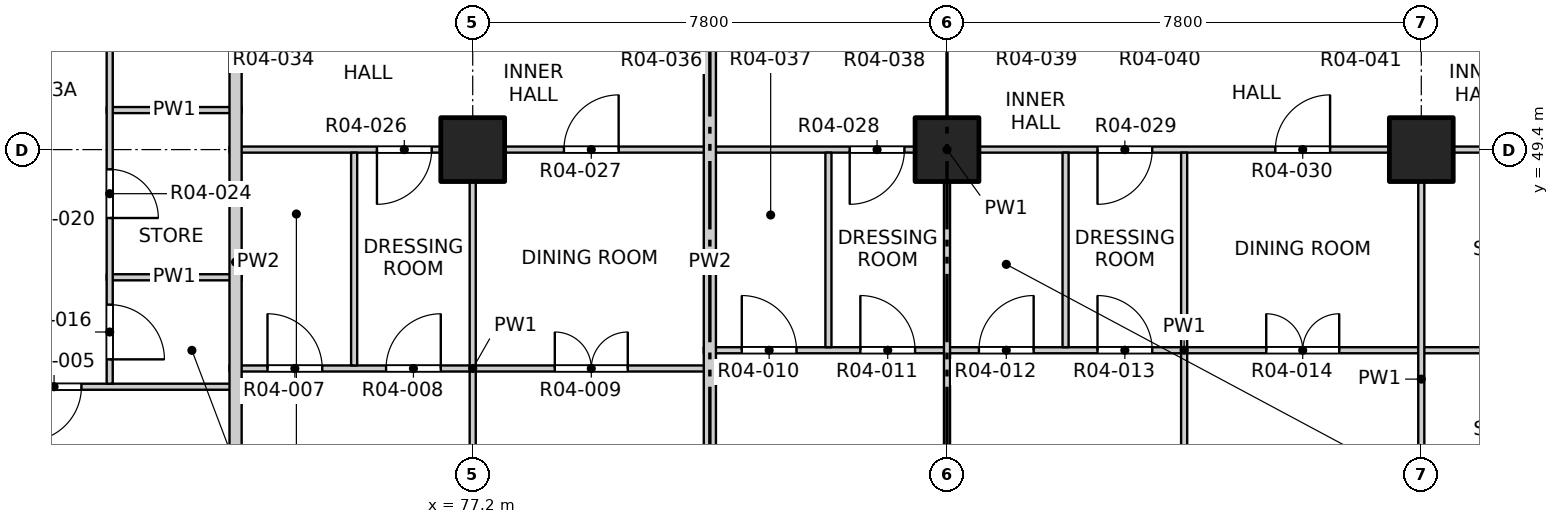
"""IFC4 building model, lengths in metres.
Left out: names, types, materials, properties, quantities, classifications, styles, units other than length and angle.
Written with IfcOpenShell. Run it as: python <this file> out.ifc"""

import sys

from ifc_helpers import new_model, si_unit, direction, frame, frame_2d, origin, origin_2d, place, context, subcontext, project, spatial, rectangle, extrude, element, fill, save


model = new_model("IFC4")
c1 = context("Model", 3, precision=1e-05, world=origin(), true_north=direction((0.0, 1.0)))
c2 = subcontext(c1, "Body", "Model", "MODEL_VIEW")
j1 = project(units=[si_unit("LENGTHUNIT", "METRE"), si_unit("PLANEANGLEUNIT", "RADIAN")], contexts=[c1])
p1 = place(None, origin())
s1 = spatial("IfcSite", under=j1, at=p1, CompositionType="ELEMENT")
p2 = place(p1, origin())
s2 = spatial("IfcBuilding", under=s1, at=p2, CompositionType="ELEMENT")
p3 = place(p2, frame((0.0, 0.0, 58.0)))
s3 = spatial("IfcBuildingStorey", under=s2, at=p3, CompositionType="ELEMENT", Elevation=58.0)
for number, where, z_axis, x_axis in (
    (1, (77.2, 49.4, -0.25), (0.0, 0.0, 1.0), (1.0, 0.0, 0.0)),
    (2, (85.0, 49.4, -0.25), (0.0, 0.0, 1.0), (1.0, 0.0, 0.0)),
    (3, (92.8, 49.4, -0.25), (0.0, 0.0, 1.0), (1.0, 0.0, 0.0)),
):
    element("IfcColumn", number, at=place(p3, frame(where, z_axis=z_axis, x_axis=x_axis)), inside=s3, PredefinedType="COLUMN", context=c2, shape_type="SweptSolid", body=[
        extrude(rectangle(XDim=1.05, YDim=1.05, at=origin_2d()), origin(), (0.0, 0.0, 1.0), 3.4),
    ])
p4 = place(p3, frame((61.9, 45.5, 0.0), z_axis=(0.0, 0.0, 1.0), x_axis=(1.0, 0.0, 0.0)))
e4 = element("IfcWall", 4, at=p4, inside=s3, PredefinedType="PARTITIONING", context=c2, shape_type="SweptSolid", body=[
    extrude(rectangle(XDim=11.5, YDim=0.1, at=frame_2d((5.75, 0.0))), origin(), (0.0, 0.0, 1.0), 3.15),
])
p5 = place(p4, frame((7.965, 0.0, 0.0)))
e5 = element("IfcOpeningElement", 5, at=p5, cuts=e4, PredefinedType="OPENING", context=c2, shape_type="SweptSolid", body=[
    extrude(rectangle(XDim=0.9, YDim=2.1, at=frame_2d((0.45, 1.05))), frame((0.0, 0.06, 0.0), z_axis=(0.0, -1.0, 0.0), x_axis=(1.0, 0.0, 0.0)), (0.0, 0.0, 1.0), 0.12),
])
p6 = place(p3, frame((73.2, 45.8, 0.0), z_axis=(0.0, 0.0, 1.0), x_axis=(1.0, 0.0, 0.0)))
e6 = element("IfcWall", 6, at=p6, inside=s3, PredefinedType="PARTITIONING", context=c2, shape_type="SweptSolid", body=[
    extrude(rectangle(XDim=8.0, YDim=0.1, at=frame_2d((4.0, 0.0))), origin(), (0.0, 0.0, 1.0), 3.15),
])
p7 = place(p6, frame((0.625, 0.0, 0.0)))
e7 = element("IfcOpeningElement", 7, at=p7, cuts=e6, PredefinedType="OPENING", context=c2, shape_type="SweptSolid", body=[
    extrude(rectangle(XDim=0.9, YDim=2.1, at=frame_2d((0.45, 1.05))), frame((0.0, 0.06, 0.0), z_axis=(0.0, -1.0, 0.0), x_axis=(1.0, 0.0, 0.0)), (0.0, 0.0, 1.0), 0.12),
])
p8 = place(p6, frame((2.575, 0.0, 0.0)))
e8 = element("IfcOpeningElement", 8, at=p8, cuts=e6, PredefinedType="OPENING", context=c2, shape_type="SweptSolid", body=[
    extrude(rectangle(XDim=0.9, YDim=2.1, at=frame_2d((0.45, 1.05))), frame((0.0, 0.06, 0.0), z_axis=(0.0, -1.0, 0.0), x_axis=(1.0, 0.0, 0.0)), (0.0, 0.0, 1.0), 0.12),
])
p9 = place(p6, frame((5.35, 0.0, 0.0)))
e9 = element("IfcOpeningElement", 9, at=p9, cuts=e6, PredefinedType="OPENING", context=c2, shape_type="SweptSolid", body=[
    extrude(rectangle(XDim=1.2, YDim=2.1, at=frame_2d((0.6, 1.05))), frame((0.0, 0.06, 0.0), z_axis=(0.0, -1.0, 0.0), x_axis=(1.0, 0.0, 0.0)), (0.0, 0.0, 1.0), 0.12),
])
p10 = place(p3, frame((81.0, 46.1, 0.0), z_axis=(0.0, 0.0, 1.0), x_axis=(1.0, 0.0, 0.0)))
e10 = element("IfcWall", 10, at=p10, inside=s3, PredefinedType="PARTITIONING", context=c2, shape_type="SweptSolid", body=[
    extrude(rectangle(XDim=15.8, YDim=0.1, at=frame_2d((7.9, 0.0))), origin(), (0.0, 0.0, 1.0), 3.15),
])
p11 = place(p10, frame((0.625, 0.0, 0.0)))
e11 = element("IfcOpeningElement", 11, at=p11, cuts=e10, PredefinedType="OPENING", context=c2, shape_type="SweptSolid", body=[
    extrude(rectangle(XDim=0.9, YDim=2.1, at=frame_2d((0.45, 1.05))), frame((0.0, 0.06, 0.0), z_axis=(0.0, -1.0, 0.0), x_axis=(1.0, 0.0, 0.0)), (0.0, 0.0, 1.0), 0.12),
])
p12 = place(p10, frame((2.575, 0.0, 0.0)))
e12 = element("IfcOpeningElement", 12, at=p12, cuts=e10, PredefinedType="OPENING", context=c2, shape_type="SweptSolid", body=[
    extrude(rectangle(XDim=0.9, YDim=2.1, at=frame_2d((0.45, 1.05))), frame((0.0, 0.06, 0.0), z_axis=(0.0, -1.0, 0.0), x_axis=(1.0, 0.0, 0.0)), (0.0, 0.0, 1.0), 0.12),
])
p13 = place(p10, frame((4.525, 0.0, 0.0)))
e13 = element("IfcOpeningElement", 13, at=p13, cuts=e10, PredefinedType="OPENING", context=c2, shape_type="SweptSolid", body=[
    extrude(rectangle(XDim=0.9, YDim=2.1, at=frame_2d((0.45, 1.05))), frame((0.0, 0.06, 0.0), z_axis=(0.0, -1.0, 0.0), x_axis=(1.0, 0.0, 0.0)), (0.0, 0.0, 1.0), 0.12),
])
p14 = place(p10, frame((6.475, 0.0, 0.0)))
e14 = element("IfcOpeningElement", 14, at=p14, cuts=e10, PredefinedType="OPENING", context=c2, shape_type="SweptSolid", body=[
    extrude(rectangle(XDim=0.9, YDim=2.1, at=frame_2d((0.45, 1.05))), frame((0.0, 0.06, 0.0), z_axis=(0.0, -1.0, 0.0), x_axis=(1.0, 0.0, 0.0)), (0.0, 0.0, 1.0), 0.12),
])
p15 = place(p10, frame((9.25, 0.0, 0.0)))
e15 = element("IfcOpeningElement", 15, at=p15, cuts=e10, PredefinedType="OPENING", context=c2, shape_type="SweptSolid", body=[
    extrude(rectangle(XDim=1.2, YDim=2.1, at=frame_2d((0.6, 1.05))), frame((0.0, 0.06, 0.0), z_axis=(0.0, -1.0, 0.0), x_axis=(1.0, 0.0, 0.0)), (0.0, 0.0, 1.0), 0.12),
])
p16 = place(p10, frame((13.15, 0.0, 0.0)))
e16 = element("IfcOpeningElement", 16, at=p16, cuts=e10, PredefinedType="OPENING", context=c2, shape_type="SweptSolid", body=[
    extrude(rectangle(XDim=1.2, YDim=2.1, at=frame_2d((0.6, 1.05))), frame((0.0, 0.06, 0.0), z_axis=(0.0, -1.0, 0.0), x_axis=(1.0, 0.0, 0.0)), (0.0, 0.0, 1.0), 0.12),
])
p17 = place(p3, frame((71.18, 47.3, 0.0), z_axis=(0.0, 0.0, 1.0), x_axis=(1.0, 0.0, 0.0)))
e17 = element("IfcWall", 17, at=p17, inside=s3, PredefinedType="PARTITIONING", context=c2, shape_type="SweptSolid", body=[
    extrude(rectangle(XDim=2.22, YDim=0.1, at=frame_2d((1.11, 0.0))), origin(), (0.0, 0.0, 1.0), 3.15),
])
p18 = place(p3, frame((73.2, 49.4, 0.0), z_axis=(0.0, 0.0, 1.0), x_axis=(1.0, 0.0, 0.0)))
e18 = element("IfcWall", 18, at=p18, inside=s3, PredefinedType="PARTITIONING", context=c2, shape_type="SweptSolid", body=[
    extrude(rectangle(XDim=23.6, YDim=0.1, at=frame_2d((11.8, 0.0))), origin(), (0.0, 0.0, 1.0), 3.15),
])
p19 = place(p18, frame((2.425, 0.0, 0.0)))
e19 = element("IfcOpeningElement", 19, at=p19, cuts=e18, PredefinedType="OPENING", context=c2, shape_type="SweptSolid", body=[
    extrude(rectangle(XDim=0.9, YDim=2.1, at=frame_2d((0.45, 1.05))), frame((0.0, 0.06, 0.0), z_axis=(0.0, -1.0, 0.0), x_axis=(1.0, 0.0, 0.0)), (0.0, 0.0, 1.0), 0.12),
])
p20 = place(p18, frame((5.5, 0.0, 0.0)))
e20 = element("IfcOpeningElement", 20, at=p20, cuts=e18, PredefinedType="OPENING", context=c2, shape_type="SweptSolid", body=[
    extrude(rectangle(XDim=0.9, YDim=2.1, at=frame_2d((0.45, 1.05))), frame((0.0, 0.06, 0.0), z_axis=(0.0, -1.0, 0.0), x_axis=(1.0, 0.0, 0.0)), (0.0, 0.0, 1.0), 0.12),
])
p21 = place(p18, frame((10.2, 0.0, 0.0)))
e21 = element("IfcOpeningElement", 21, at=p21, cuts=e18, PredefinedType="OPENING", context=c2, shape_type="SweptSolid", body=[
    extrude(rectangle(XDim=0.9, YDim=2.1, at=frame_2d((0.45, 1.05))), frame((0.0, 0.06, 0.0), z_axis=(0.0, -1.0, 0.0), x_axis=(1.0, 0.0, 0.0)), (0.0, 0.0, 1.0), 0.12),
])
p22 = place(p18, frame((14.275, 0.0, 0.0)))
e22 = element("IfcOpeningElement", 22, at=p22, cuts=e18, PredefinedType="OPENING", context=c2, shape_type="SweptSolid", body=[
    extrude(rectangle(XDim=0.9, YDim=2.1, at=frame_2d((0.45, 1.05))), frame((0.0, 0.06, 0.0), z_axis=(0.0, -1.0, 0.0), x_axis=(1.0, 0.0, 0.0)), (0.0, 0.0, 1.0), 0.12),
])
p23 = place(p18, frame((17.2, 0.0, 0.0)))
e23 = element("IfcOpeningElement", 23, at=p23, cuts=e18, PredefinedType="OPENING", context=c2, shape_type="SweptSolid", body=[
    extrude(rectangle(XDim=0.9, YDim=2.1, at=frame_2d((0.45, 1.05))), frame((0.0, 0.06, 0.0), z_axis=(0.0, -1.0, 0.0), x_axis=(1.0, 0.0, 0.0)), (0.0, 0.0, 1.0), 0.12),
])
p24 = place(p18, frame((21.1, 0.0, 0.0)))
e24 = element("IfcOpeningElement", 24, at=p24, cuts=e18, PredefinedType="OPENING", context=c2, shape_type="SweptSolid", body=[
    extrude(rectangle(XDim=0.9, YDim=2.1, at=frame_2d((0.45, 1.05))), frame((0.0, 0.06, 0.0), z_axis=(0.0, -1.0, 0.0), x_axis=(1.0, 0.0, 0.0)), (0.0, 0.0, 1.0), 0.12),
])
p25 = place(p3, frame((71.18, 50.05, 0.0), z_axis=(0.0, 0.0, 1.0), x_axis=(1.0, 0.0, 0.0)))
e25 = element("IfcWall", 25, at=p25, inside=s3, PredefinedType="PARTITIONING", context=c2, shape_type="SweptSolid", body=[
    extrude(rectangle(XDim=2.22, YDim=0.1, at=frame_2d((1.11, 0.0))), origin(), (0.0, 0.0, 1.0), 3.15),
])
p26 = place(p3, frame((71.23, 45.55, 0.0), z_axis=(0.0, 0.0, 1.0), x_axis=(0.0, 1.0, 0.0)))
e26 = element("IfcWall", 26, at=p26, inside=s3, PredefinedType="PARTITIONING", context=c2, shape_type="SweptSolid", body=[
    extrude(rectangle(XDim=9.85, YDim=0.1, at=frame_2d((4.925, 0.0))), origin(), (0.0, 0.0, 1.0), 3.15),
])
p27 = place(p26, frame((0.4, 0.0, 0.0)))
e27 = element("IfcOpeningElement", 27, at=p27, cuts=e26, PredefinedType="OPENING", context=c2, shape_type="SweptSolid", body=[
    extrude(rectangle(XDim=0.9, YDim=2.1, at=frame_2d((0.45, 1.05))), frame((0.0, 0.06, 0.0), z_axis=(0.0, -1.0, 0.0), x_axis=(1.0, 0.0, 0.0)), (0.0, 0.0, 1.0), 0.12),
])
p28 = place(p26, frame((2.725, 0.0, 0.0)))
e28 = element("IfcOpeningElement", 28, at=p28, cuts=e26, PredefinedType="OPENING", context=c2, shape_type="SweptSolid", body=[
    extrude(rectangle(XDim=0.8, YDim=2.1, at=frame_2d((0.4, 1.05))), frame((0.0, 0.06, 0.0), z_axis=(0.0, -1.0, 0.0), x_axis=(1.0, 0.0, 0.0)), (0.0, 0.0, 1.0), 0.12),
])
p29 = place(p26, frame((5.6, 0.0, 0.0)))
e29 = element("IfcOpeningElement", 29, at=p29, cuts=e26, PredefinedType="OPENING", context=c2, shape_type="SweptSolid", body=[
    extrude(rectangle(XDim=0.8, YDim=2.1, at=frame_2d((0.4, 1.05))), frame((0.0, 0.06, 0.0), z_axis=(0.0, -1.0, 0.0), x_axis=(1.0, 0.0, 0.0)), (0.0, 0.0, 1.0), 0.12),
])
p30 = place(p26, frame((8.25, 0.0, 0.0)))
e30 = element("IfcOpeningElement", 30, at=p30, cuts=e26, PredefinedType="OPENING", context=c2, shape_type="SweptSolid", body=[
    extrude(rectangle(XDim=0.9, YDim=2.1, at=frame_2d((0.45, 1.05))), frame((0.0, 0.06, 0.0), z_axis=(0.0, -1.0, 0.0), x_axis=(1.0, 0.0, 0.0)), (0.0, 0.0, 1.0), 0.12),
])
p31 = place(p3, frame((73.3, 41.9, 0.0), z_axis=(0.0, 0.0, 1.0), x_axis=(0.0, 1.0, 0.0)))
e31 = element("IfcWall", 31, at=p31, inside=s3, PredefinedType="PARTITIONING", context=c2, shape_type="SweptSolid", body=[
    extrude(rectangle(XDim=11.3, YDim=0.2, at=frame_2d((5.65, 0.0))), origin(), (0.0, 0.0, 1.0), 3.15),
])
p32 = place(p3, frame((75.25, 45.85, 0.0), z_axis=(0.0, 0.0, 1.0), x_axis=(0.0, 1.0, 0.0)))
e32 = element("IfcWall", 32, at=p32, inside=s3, PredefinedType="PARTITIONING", context=c2, shape_type="SweptSolid", body=[
    extrude(rectangle(XDim=3.5, YDim=0.1, at=frame_2d((1.75, 0.0))), origin(), (0.0, 0.0, 1.0), 3.15),
])
p33 = place(p3, frame((77.2, 41.9, 0.0), z_axis=(0.0, 0.0, 1.0), x_axis=(0.0, 1.0, 0.0)))
e33 = element("IfcWall", 33, at=p33, inside=s3, PredefinedType="PARTITIONING", context=c2, shape_type="SweptSolid", body=[
    extrude(rectangle(XDim=7.45, YDim=0.1, at=frame_2d((3.725, 0.0))), origin(), (0.0, 0.0, 1.0), 2.55),
])
p34 = place(p3, frame((81.1, 41.9, 0.0), z_axis=(0.0, 0.0, 1.0), x_axis=(0.0, 1.0, 0.0)))
e34 = element("IfcWall", 34, at=p34, inside=s3, PredefinedType="PARTITIONING", context=c2, shape_type="SweptSolid", body=[
    extrude(rectangle(XDim=11.3, YDim=0.2, at=frame_2d((5.65, 0.0))), origin(), (0.0, 0.0, 1.0), 3.15),
])
p35 = place(p3, frame((83.05, 46.15, 0.0), z_axis=(0.0, 0.0, 1.0), x_axis=(0.0, 1.0, 0.0)))
e35 = element("IfcWall", 35, at=p35, inside=s3, PredefinedType="PARTITIONING", context=c2, shape_type="SweptSolid", body=[
    extrude(rectangle(XDim=3.2, YDim=0.1, at=frame_2d((1.6, 0.0))), origin(), (0.0, 0.0, 1.0), 3.15),
])
p36 = place(p3, frame((85.0, 41.9, 0.0), z_axis=(0.0, 0.0, 1.0), x_axis=(0.0, 1.0, 0.0)))
e36 = element("IfcWall", 36, at=p36, inside=s3, PredefinedType="PARTITIONING", context=c2, shape_type="SweptSolid", body=[
    extrude(rectangle(XDim=7.45, YDim=0.1, at=frame_2d((3.725, 0.0))), origin(), (0.0, 0.0, 1.0), 2.55),
])
p37 = place(p3, frame((86.95, 46.15, 0.0), z_axis=(0.0, 0.0, 1.0), x_axis=(0.0, 1.0, 0.0)))
e37 = element("IfcWall", 37, at=p37, inside=s3, PredefinedType="PARTITIONING", context=c2, shape_type="SweptSolid", body=[
    extrude(rectangle(XDim=3.2, YDim=0.1, at=frame_2d((1.6, 0.0))), origin(), (0.0, 0.0, 1.0), 3.15),
])
p38 = place(p3, frame((88.9, 41.9, 0.0), z_axis=(0.0, 0.0, 1.0), x_axis=(0.0, 1.0, 0.0)))
e38 = element("IfcWall", 38, at=p38, inside=s3, PredefinedType="PARTITIONING", context=c2, shape_type="SweptSolid", body=[
    extrude(rectangle(XDim=7.45, YDim=0.1, at=frame_2d((3.725, 0.0))), origin(), (0.0, 0.0, 1.0), 3.15),
])
p39 = place(p3, frame((92.8, 41.9, 0.0), z_axis=(0.0, 0.0, 1.0), x_axis=(0.0, 1.0, 0.0)))
e39 = element("IfcWall", 39, at=p39, inside=s3, PredefinedType="PARTITIONING", context=c2, shape_type="SweptSolid", body=[
    extrude(rectangle(XDim=7.45, YDim=0.1, at=frame_2d((3.725, 0.0))), origin(), (0.0, 0.0, 1.0), 2.55),
])
p40 = place(p5, origin())
e40 = element("IfcDoor", 40, at=p40, inside=s3, OperationType="SINGLE_SWING_RIGHT", PredefinedType="DOOR", context=c2, shape_type="SweptSolid", body=[
    extrude(rectangle(XDim=0.9, YDim=2.1, at=frame_2d((0.45, 1.05))), frame((0.0, 0.025, 0.0), z_axis=(0.0, -1.0, 0.0), x_axis=(1.0, 0.0, 0.0)), (0.0, 0.0, 1.0), 0.05),
])
fill(e5, e40)
p41 = place(p7, origin())
e41 = element("IfcDoor", 41, at=p41, inside=s3, OperationType="SINGLE_SWING_LEFT", PredefinedType="DOOR", context=c2, shape_type="SweptSolid", body=[
    extrude(rectangle(XDim=0.9, YDim=2.1, at=frame_2d((0.45, 1.05))), frame((0.0, 0.025, 0.0), z_axis=(0.0, -1.0, 0.0), x_axis=(1.0, 0.0, 0.0)), (0.0, 0.0, 1.0), 0.05),
])
fill(e7, e41)
p42 = place(p8, origin())
e42 = element("IfcDoor", 42, at=p42, inside=s3, OperationType="SINGLE_SWING_RIGHT", PredefinedType="DOOR", context=c2, shape_type="SweptSolid", body=[
    extrude(rectangle(XDim=0.9, YDim=2.1, at=frame_2d((0.45, 1.05))), frame((0.0, 0.025, 0.0), z_axis=(0.0, -1.0, 0.0), x_axis=(1.0, 0.0, 0.0)), (0.0, 0.0, 1.0), 0.05),
])
fill(e8, e42)
p43 = place(p9, origin())
e43 = element("IfcDoor", 43, at=p43, inside=s3, OperationType="DOUBLE_DOOR_SINGLE_SWING", PredefinedType="DOOR", context=c2, shape_type="SweptSolid", body=[
    extrude(rectangle(XDim=1.2, YDim=2.1, at=frame_2d((0.6, 1.05))), frame((0.0, 0.025, 0.0), z_axis=(0.0, -1.0, 0.0), x_axis=(1.0, 0.0, 0.0)), (0.0, 0.0, 1.0), 0.05),
])
fill(e9, e43)
p44 = place(p11, origin())
e44 = element("IfcDoor", 44, at=p44, inside=s3, OperationType="SINGLE_SWING_LEFT", PredefinedType="DOOR", context=c2, shape_type="SweptSolid", body=[
    extrude(rectangle(XDim=0.9, YDim=2.1, at=frame_2d((0.45, 1.05))), frame((0.0, 0.025, 0.0), z_axis=(0.0, -1.0, 0.0), x_axis=(1.0, 0.0, 0.0)), (0.0, 0.0, 1.0), 0.05),
])
fill(e11, e44)
p45 = place(p12, origin())
e45 = element("IfcDoor", 45, at=p45, inside=s3, OperationType="SINGLE_SWING_LEFT", PredefinedType="DOOR", context=c2, shape_type="SweptSolid", body=[
    extrude(rectangle(XDim=0.9, YDim=2.1, at=frame_2d((0.45, 1.05))), frame((0.0, 0.025, 0.0), z_axis=(0.0, -1.0, 0.0), x_axis=(1.0, 0.0, 0.0)), (0.0, 0.0, 1.0), 0.05),
])
fill(e12, e45)
p46 = place(p13, origin())
e46 = element("IfcDoor", 46, at=p46, inside=s3, OperationType="SINGLE_SWING_RIGHT", PredefinedType="DOOR", context=c2, shape_type="SweptSolid", body=[
    extrude(rectangle(XDim=0.9, YDim=2.1, at=frame_2d((0.45, 1.05))), frame((0.0, 0.025, 0.0), z_axis=(0.0, -1.0, 0.0), x_axis=(1.0, 0.0, 0.0)), (0.0, 0.0, 1.0), 0.05),
])
fill(e13, e46)
p47 = place(p14, origin())
e47 = element("IfcDoor", 47, at=p47, inside=s3, OperationType="SINGLE_SWING_LEFT", PredefinedType="DOOR", context=c2, shape_type="SweptSolid", body=[
    extrude(rectangle(XDim=0.9, YDim=2.1, at=frame_2d((0.45, 1.05))), frame((0.0, 0.025, 0.0), z_axis=(0.0, -1.0, 0.0), x_axis=(1.0, 0.0, 0.0)), (0.0, 0.0, 1.0), 0.05),
])
fill(e14, e47)
p48 = place(p15, origin())
e48 = element("IfcDoor", 48, at=p48, inside=s3, OperationType="DOUBLE_DOOR_SINGLE_SWING", PredefinedType="DOOR", context=c2, shape_type="SweptSolid", body=[
    extrude(rectangle(XDim=1.2, YDim=2.1, at=frame_2d((0.6, 1.05))), frame((0.0, 0.025, 0.0), z_axis=(0.0, -1.0, 0.0), x_axis=(1.0, 0.0, 0.0)), (0.0, 0.0, 1.0), 0.05),
])
fill(e15, e48)
p49 = place(p27, origin())
e49 = element("IfcDoor", 49, at=p49, inside=s3, OperationType="SINGLE_SWING_RIGHT", PredefinedType="DOOR", context=c2, shape_type="SweptSolid", body=[
    extrude(rectangle(XDim=0.9, YDim=2.1, at=frame_2d((0.45, 1.05))), frame((0.0, 0.025, 0.0), z_axis=(0.0, -1.0, 0.0), x_axis=(1.0, 0.0, 0.0)), (0.0, 0.0, 1.0), 0.05),
])
fill(e27, e49)
p50 = place(p28, origin())
e50 = element("IfcDoor", 50, at=p50, inside=s3, OperationType="SINGLE_SWING_RIGHT", PredefinedType="DOOR", context=c2, shape_type="SweptSolid", body=[
    extrude(rectangle(XDim=0.8, YDim=2.1, at=frame_2d((0.4, 1.05))), frame((0.0, 0.025, 0.0), z_axis=(0.0, -1.0, 0.0), x_axis=(1.0, 0.0, 0.0)), (0.0, 0.0, 1.0), 0.05),
])
fill(e28, e50)
p51 = place(p19, origin())
e51 = element("IfcDoor", 51, at=p51, inside=s3, OperationType="SINGLE_SWING_RIGHT", PredefinedType="DOOR", context=c2, shape_type="SweptSolid", body=[
    extrude(rectangle(XDim=0.9, YDim=2.1, at=frame_2d((0.45, 1.05))), frame((0.0, 0.025, 0.0), z_axis=(0.0, -1.0, 0.0), x_axis=(1.0, 0.0, 0.0)), (0.0, 0.0, 1.0), 0.05),
])
fill(e19, e51)
p52 = place(p20, origin())
e52 = element("IfcDoor", 52, at=p52, inside=s3, OperationType="SINGLE_SWING_RIGHT", PredefinedType="DOOR", context=c2, shape_type="SweptSolid", body=[
    extrude(rectangle(XDim=0.9, YDim=2.1, at=frame_2d((0.45, 1.05))), frame((0.0, 0.025, 0.0), z_axis=(0.0, -1.0, 0.0), x_axis=(1.0, 0.0, 0.0)), (0.0, 0.0, 1.0), 0.05),
])
fill(e20, e52)
p53 = place(p21, origin())
e53 = element("IfcDoor", 53, at=p53, inside=s3, OperationType="SINGLE_SWING_RIGHT", PredefinedType="DOOR", context=c2, shape_type="SweptSolid", body=[
    extrude(rectangle(XDim=0.9, YDim=2.1, at=frame_2d((0.45, 1.05))), frame((0.0, 0.025, 0.0), z_axis=(0.0, -1.0, 0.0), x_axis=(1.0, 0.0, 0.0)), (0.0, 0.0, 1.0), 0.05),
])
fill(e21, e53)
p54 = place(p22, origin())
e54 = element("IfcDoor", 54, at=p54, inside=s3, OperationType="SINGLE_SWING_RIGHT", PredefinedType="DOOR", context=c2, shape_type="SweptSolid", body=[
    extrude(rectangle(XDim=0.9, YDim=2.1, at=frame_2d((0.45, 1.05))), frame((0.0, 0.025, 0.0), z_axis=(0.0, -1.0, 0.0), x_axis=(1.0, 0.0, 0.0)), (0.0, 0.0, 1.0), 0.05),
])
fill(e22, e54)
p55 = place(p23, origin())
e55 = element("IfcDoor", 55, at=p55, inside=s3, OperationType="SINGLE_SWING_RIGHT", PredefinedType="DOOR", context=c2, shape_type="SweptSolid", body=[
    extrude(rectangle(XDim=0.9, YDim=2.1, at=frame_2d((0.45, 1.05))), frame((0.0, 0.025, 0.0), z_axis=(0.0, -1.0, 0.0), x_axis=(1.0, 0.0, 0.0)), (0.0, 0.0, 1.0), 0.05),
])
fill(e23, e55)
save(model, sys.argv[1])
